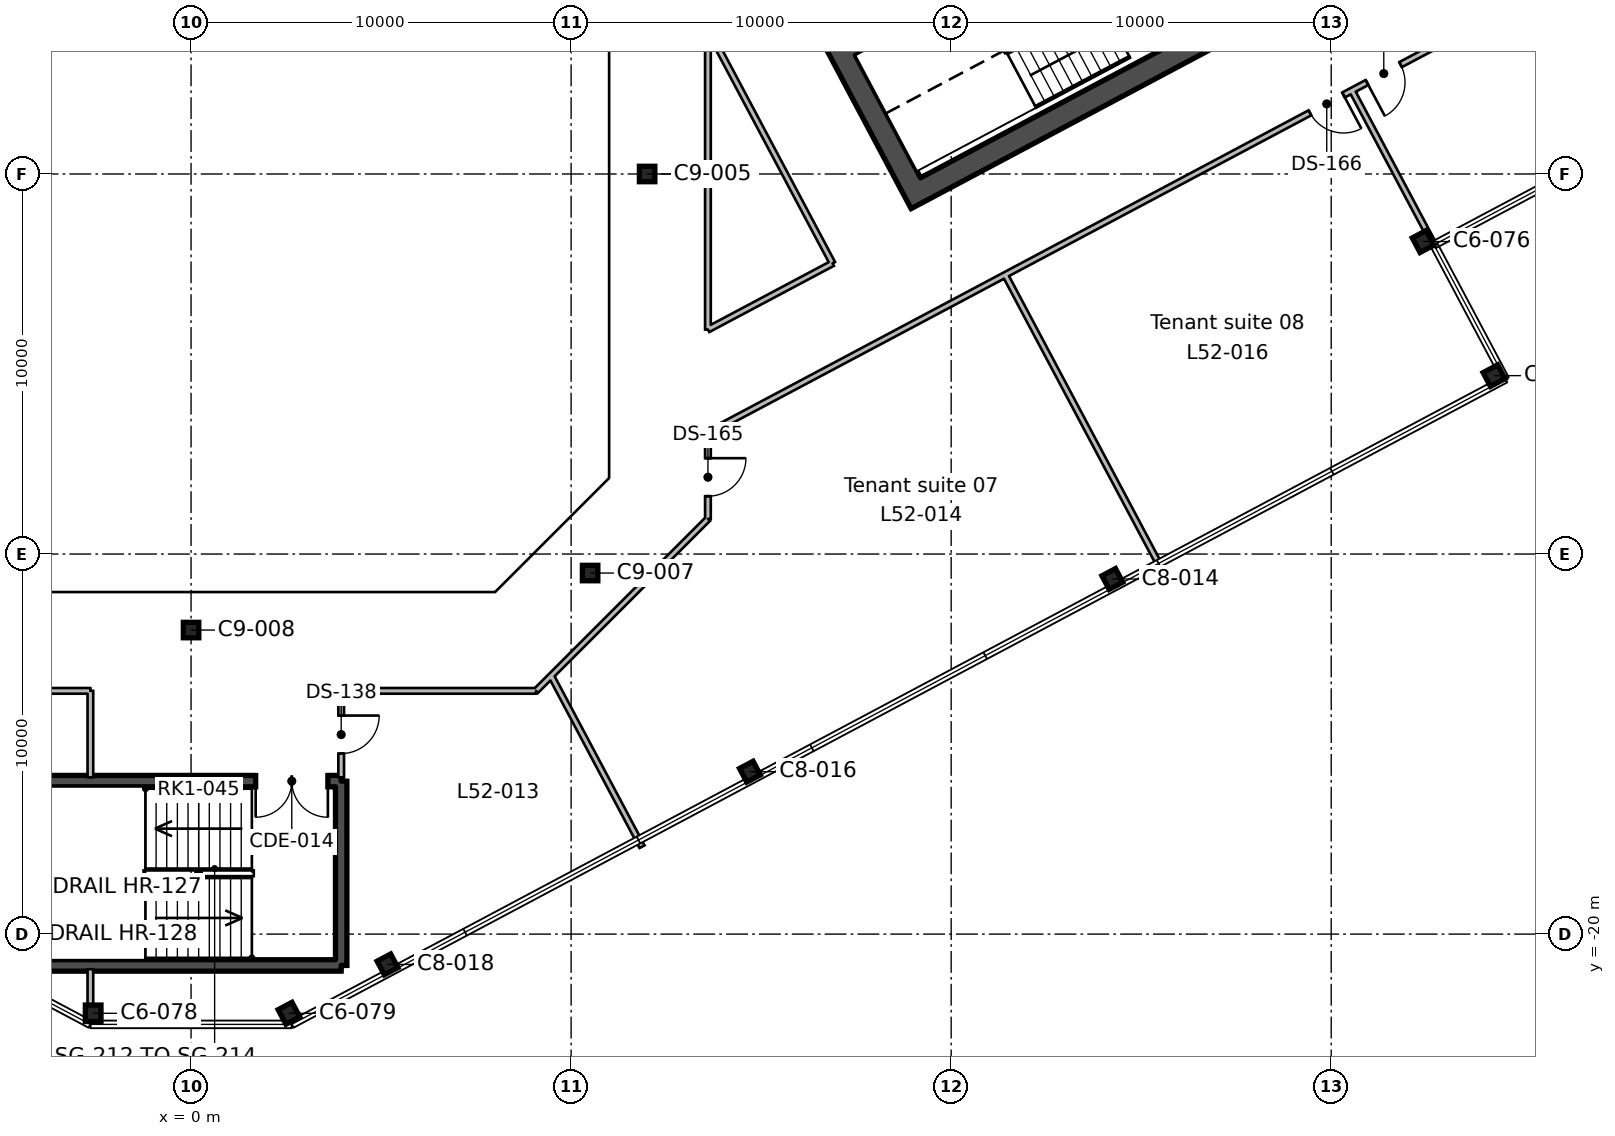
"""IFC4 building model, lengths in metres.
Left out: names, types, materials, properties, quantities, classifications, styles, units other than length and angle.
Written with IfcOpenShell. Run it as: python <this file> out.ifc"""

import sys

from ifc_helpers import new_model, si_unit, direction, frame, frame_2d, origin, origin_2d, place, context, subcontext, project, spatial, rectangle, hollow_rectangle, i_section, extrude, element, fill, save


model = new_model("IFC4")
c1 = context("Model", 3, precision=1e-05, world=origin(), true_north=direction((0.0, 1.0)))
c2 = subcontext(c1, "Body", "Model", "MODEL_VIEW")
j1 = project(units=[si_unit("LENGTHUNIT", "METRE"), si_unit("PLANEANGLEUNIT", "RADIAN")], contexts=[c1])
p1 = place(None, origin())
s1 = spatial("IfcSite", under=j1, at=p1, CompositionType="ELEMENT")
p2 = place(p1, origin())
s2 = spatial("IfcBuilding", under=s1, at=p2, CompositionType="ELEMENT")
p3 = place(p2, frame((0.0, 0.0, 236.4)))
s3 = spatial("IfcBuildingStorey", under=s2, at=p3, CompositionType="ELEMENT", Elevation=236.4)
for number, where, z_axis, x_axis in (
    (1, (-2.576, -22.084, 0.0), (0.0, 0.0, 1.0), (1.0, 0.0, 0.0)),
    (2, (2.576, -22.084, 0.0), (0.0, 0.0, 1.0), (0.883, 0.469, 0.0)),
):
    element("IfcColumn", number, at=place(p3, frame(where, z_axis=z_axis, x_axis=x_axis)), inside=s3, PredefinedType="COLUMN", context=c2, shape_type="SweptSolid", body=[
        extrude(i_section(OverallWidth=0.412, OverallDepth=0.434, WebThickness=0.036, FlangeThickness=0.057, FilletRadius=0.015, at=origin_2d()), origin(), (0.0, 0.0, 1.0), 3.9),
    ])
for number, where, z_axis, x_axis in (
    (3, (5.169, -20.798, 0.0), (0.0, 0.0, 1.0), (0.883, 0.469, 0.0)),
    (4, (14.705, -15.727, 0.0), (0.0, 0.0, 1.0), (0.883, 0.469, 0.0)),
):
    element("IfcColumn", number, at=place(p3, frame(where, z_axis=z_axis, x_axis=x_axis)), inside=s3, PredefinedType="COLUMN", context=c2, shape_type="SweptSolid", body=[
        extrude(i_section(OverallWidth=0.404, OverallDepth=0.406, WebThickness=0.027, FlangeThickness=0.044, FilletRadius=0.015, at=origin_2d()), origin(), (0.0, 0.0, 1.0), 3.9),
    ])
p4 = place(p3, frame((0.0, -12.0, 0.0), z_axis=(0.0, 0.0, 1.0), x_axis=(1.0, 0.0, 0.0)))
e5 = element("IfcColumn", 5, at=p4, inside=s3, PredefinedType="COLUMN", context=c2, shape_type="SweptSolid", body=[
    extrude(hollow_rectangle(XDim=0.406, YDim=0.406, WallThickness=0.015, InnerFilletRadius=0.007, OuterFilletRadius=0.022, at=origin_2d()), origin(), (0.0, 0.0, 1.0), 3.9),
])
p5 = place(p3, frame((24.241, -10.657, 0.0), z_axis=(0.0, 0.0, 1.0), x_axis=(0.882947592859, 0.469471562786, 0.0)))
e6 = element("IfcColumn", 6, at=p5, inside=s3, PredefinedType="COLUMN", context=c2, shape_type="SweptSolid", body=[
    extrude(i_section(OverallWidth=0.404, OverallDepth=0.406, WebThickness=0.027, FlangeThickness=0.044, FilletRadius=0.015, at=origin_2d()), origin(), (0.0, 0.0, 1.0), 3.9),
])
p6 = place(p3, frame((10.5, -10.5, 0.0), z_axis=(0.0, 0.0, 1.0), x_axis=(1.0, 0.0, 0.0)))
e7 = element("IfcColumn", 7, at=p6, inside=s3, PredefinedType="COLUMN", context=c2, shape_type="SweptSolid", body=[
    extrude(hollow_rectangle(XDim=0.406, YDim=0.406, WallThickness=0.015, InnerFilletRadius=0.007, OuterFilletRadius=0.022, at=origin_2d()), origin(), (0.0, 0.0, 1.0), 3.9),
])
for number, where, z_axis, x_axis in (
    (8, (34.285, -5.306, 0.0), (0.0, 0.0, 1.0), (-0.469, 0.883, 0.0)),
    (9, (32.417, -1.777, 0.0), (0.0, 0.0, 1.0), (0.883, 0.469, 0.0)),
):
    element("IfcColumn", number, at=place(p3, frame(where, z_axis=z_axis, x_axis=x_axis)), inside=s3, PredefinedType="COLUMN", context=c2, shape_type="SweptSolid", body=[
        extrude(i_section(OverallWidth=0.412, OverallDepth=0.434, WebThickness=0.036, FlangeThickness=0.057, FilletRadius=0.015, at=origin_2d()), origin(), (0.0, 0.0, 1.0), 3.9),
    ])
p7 = place(p3, frame((12.0, 0.0, 0.0), z_axis=(0.0, 0.0, 1.0), x_axis=(1.0, 0.0, 0.0)))
e10 = element("IfcColumn", 10, at=p7, inside=s3, PredefinedType="COLUMN", context=c2, shape_type="SweptSolid", body=[
    extrude(hollow_rectangle(XDim=0.406, YDim=0.406, WallThickness=0.015, InnerFilletRadius=0.007, OuterFilletRadius=0.022, at=origin_2d()), origin(), (0.0, 0.0, 1.0), 3.9),
])
p8 = place(p3, frame((19.211, -0.771, 0.0), z_axis=(0.0, 0.0, 1.0), x_axis=(-0.469463742137, 0.882951751127, 0.0)))
e11 = element("IfcWall", 11, at=p8, inside=s3, PredefinedType="SHEAR", context=c2, shape_type="SweptSolid", body=[
    extrude(rectangle(XDim=19.4, YDim=0.6, at=frame_2d((9.7, 0.0))), origin(), (0.0, 0.0, 1.0), 3.9),
])
p9 = place(p8, frame((6.7, 0.0, 0.0)))
e12 = element("IfcOpeningElement", 12, at=p9, cuts=e11, PredefinedType="OPENING", context=c2, shape_type="SweptSolid", body=[
    extrude(rectangle(XDim=2.4, YDim=2.4, at=frame_2d((1.2, 1.2))), frame((0.0, 0.31, 0.0), z_axis=(0.0, -1.0, 0.0), x_axis=(1.0, 0.0, 0.0)), (0.0, 0.0, 1.0), 0.62),
])
p10 = place(p3, frame((19.335, -0.366, 0.0), z_axis=(0.0, 0.0, 1.0), x_axis=(0.88294509198, 0.469476266226, 0.0)))
e13 = element("IfcWall", 13, at=p10, inside=s3, PredefinedType="SHEAR", context=c2, shape_type="SweptSolid", body=[
    extrude(rectangle(XDim=20.2, YDim=0.6, at=frame_2d((10.1, 0.0))), origin(), (0.0, 0.0, 1.0), 3.9),
])
p11 = place(p3, frame((17.434, 3.21, 0.0), z_axis=(0.0, 0.0, 1.0), x_axis=(0.882940221191, 0.469485426614, 0.0)))
e14 = element("IfcWall", 14, at=p11, inside=s3, PredefinedType="SHEAR", context=c2, shape_type="SweptSolid", body=[
    extrude(rectangle(XDim=8.0, YDim=0.2, at=frame_2d((4.0, 0.0))), origin(), (0.0, 0.0, 1.0), 3.9),
])
p12 = place(p3, frame((3.95, -15.975, 0.0), z_axis=(0.0, 0.0, 1.0), x_axis=(0.0, -1.0, 0.0)))
e15 = element("IfcWall", 15, at=p12, inside=s3, PredefinedType="SHEAR", context=c2, shape_type="SweptSolid", body=[
    extrude(rectangle(XDim=4.85, YDim=0.3, at=frame_2d((2.425, 0.0))), origin(), (0.0, 0.0, 1.0), 3.9),
])
p13 = place(p3, frame((3.95, -20.825, 0.0), z_axis=(0.0, 0.0, 1.0), x_axis=(-1.0, 0.0, 0.0)))
e16 = element("IfcWall", 16, at=p13, inside=s3, PredefinedType="SHEAR", context=c2, shape_type="SweptSolid", body=[
    extrude(rectangle(XDim=8.3, YDim=0.3, at=frame_2d((4.15, 0.0))), origin(), (0.0, 0.0, 1.0), 3.9),
])
p14 = place(p3, frame((-4.35, -15.975, 0.0), z_axis=(0.0, 0.0, 1.0), x_axis=(1.0, 0.0, 0.0)))
e17 = element("IfcWall", 17, at=p14, inside=s3, PredefinedType="SHEAR", context=c2, shape_type="SweptSolid", body=[
    extrude(rectangle(XDim=8.3, YDim=0.3, at=frame_2d((4.15, 0.0))), origin(), (0.0, 0.0, 1.0), 3.9),
])
p15 = place(p14, frame((6.05, 0.0, 0.0)))
e18 = element("IfcOpeningElement", 18, at=p15, cuts=e17, PredefinedType="OPENING", context=c2, shape_type="SweptSolid", body=[
    extrude(rectangle(XDim=1.9, YDim=2.1, at=frame_2d((0.95, 1.05))), frame((0.0, 0.16, 0.0), z_axis=(0.0, -1.0, 0.0), x_axis=(1.0, 0.0, 0.0)), (0.0, 0.0, 1.0), 0.32),
])
p16 = place(p3, frame((-2.649, -13.6, 0.0), z_axis=(0.0, 0.0, 1.0), x_axis=(-1.0, 0.0, 0.0)))
e19 = element("IfcWall", 19, at=p16, inside=s3, PredefinedType="PARTITIONING", context=c2, shape_type="SweptSolid", body=[
    extrude(rectangle(XDim=6.428, YDim=0.15, at=frame_2d((3.214, 0.0))), origin(), (0.0, 0.0, 1.0), 3.54),
])
p17 = place(p3, frame((-2.649, -13.6, 0.0), z_axis=(0.0, 0.0, 1.0), x_axis=(0.0, -1.0, 0.0)))
e20 = element("IfcWall", 20, at=p17, inside=s3, PredefinedType="PARTITIONING", context=c2, shape_type="SweptSolid", body=[
    extrude(rectangle(XDim=2.275, YDim=0.15, at=frame_2d((1.137, 0.0))), origin(), (0.0, 0.0, 1.0), 3.54),
])
p18 = place(p3, frame((-2.649, -20.925, 0.0), z_axis=(0.0, 0.0, 1.0), x_axis=(0.0, -1.0, 0.0)))
e21 = element("IfcWall", 21, at=p18, inside=s3, PredefinedType="PARTITIONING", context=c2, shape_type="SweptSolid", body=[
    extrude(rectangle(XDim=0.942, YDim=0.15, at=frame_2d((0.471, 0.0))), origin(), (0.0, 0.0, 1.0), 3.54),
])
p19 = place(p3, frame((4.938, -13.6, 0.0), z_axis=(0.0, 0.0, 1.0), x_axis=(-1.0, 0.0, 0.0)))
e22 = element("IfcWall", 22, at=p19, inside=s3, PredefinedType="PARTITIONING", context=c2, shape_type="SweptSolid", body=[
    extrude(rectangle(XDim=0.988, YDim=0.15, at=frame_2d((0.494, 0.0))), origin(), (0.0, 0.0, 1.0), 3.54),
])
p20 = place(p3, frame((3.95, -13.6, 0.0), z_axis=(0.0, 0.0, 1.0), x_axis=(0.0, -1.0, 0.0)))
e23 = element("IfcWall", 23, at=p20, inside=s3, PredefinedType="PARTITIONING", context=c2, shape_type="SweptSolid", body=[
    extrude(rectangle(XDim=2.275, YDim=0.15, at=frame_2d((1.137, 0.0))), origin(), (0.0, 0.0, 1.0), 3.54),
])
p21 = place(p20, frame((0.65, 0.0, 0.0)))
e24 = element("IfcOpeningElement", 24, at=p21, cuts=e23, PredefinedType="OPENING", context=c2, shape_type="SweptSolid", body=[
    extrude(rectangle(XDim=1.0, YDim=2.1, at=frame_2d((0.5, 1.05))), frame((0.0, 0.085, 0.0), z_axis=(0.0, -1.0, 0.0), x_axis=(1.0, 0.0, 0.0)), (0.0, 0.0, 1.0), 0.17),
])
p22 = place(p3, frame((9.473, -13.204, 0.0), z_axis=(0.0, 0.0, 1.0), x_axis=(-0.707106781187, -0.707106781187, 0.0)))
e25 = element("IfcWall", 25, at=p22, inside=s3, PredefinedType="PARTITIONING", context=c2, shape_type="SweptSolid", body=[
    extrude(rectangle(XDim=0.56, YDim=0.15, at=frame_2d((0.28, 0.0))), origin(), (0.0, 0.0, 1.0), 3.54),
])
p23 = place(p3, frame((9.077, -13.6, 0.0), z_axis=(0.0, 0.0, 1.0), x_axis=(-1.0, 0.0, 0.0)))
e26 = element("IfcWall", 26, at=p23, inside=s3, PredefinedType="PARTITIONING", context=c2, shape_type="SweptSolid", body=[
    extrude(rectangle(XDim=4.139, YDim=0.15, at=frame_2d((2.069, 0.0))), origin(), (0.0, 0.0, 1.0), 3.54),
])
p24 = place(p3, frame((9.474, -13.202, 0.0), z_axis=(0.0, 0.0, 1.0), x_axis=(0.46942145483, -0.882974233908, 0.0)))
e27 = element("IfcWall", 27, at=p24, inside=s3, PredefinedType="PARTITIONING", context=c2, shape_type="SweptSolid", body=[
    extrude(rectangle(XDim=5.095, YDim=0.15, at=frame_2d((2.548, 0.0))), origin(), (0.0, 0.0, 1.0), 3.54),
])
p25 = place(p3, frame((13.6, -6.828, 0.0), z_axis=(0.0, 0.0, 1.0), x_axis=(0.0, -1.0, 0.0)))
e28 = element("IfcWall", 28, at=p25, inside=s3, PredefinedType="PARTITIONING", context=c2, shape_type="SweptSolid", body=[
    extrude(rectangle(XDim=2.249, YDim=0.15, at=frame_2d((1.125, 0.0))), origin(), (0.0, 0.0, 1.0), 3.54),
])
p26 = place(p25, frame((0.65, 0.0, 0.0)))
e29 = element("IfcOpeningElement", 29, at=p26, cuts=e28, PredefinedType="OPENING", context=c2, shape_type="SweptSolid", body=[
    extrude(rectangle(XDim=1.0, YDim=2.1, at=frame_2d((0.5, 1.05))), frame((0.0, 0.085, 0.0), z_axis=(0.0, -1.0, 0.0), x_axis=(1.0, 0.0, 0.0)), (0.0, 0.0, 1.0), 0.17),
])
p27 = place(p3, frame((13.6, -9.077, 0.0), z_axis=(0.0, 0.0, 1.0), x_axis=(-0.707106781187, -0.707106781187, 0.0)))
e30 = element("IfcWall", 30, at=p27, inside=s3, PredefinedType="PARTITIONING", context=c2, shape_type="SweptSolid", body=[
    extrude(rectangle(XDim=5.882, YDim=0.15, at=frame_2d((2.941, 0.0))), origin(), (0.0, 0.0, 1.0), 3.54),
])
p28 = place(p3, frame((21.421, -2.654, 0.0), z_axis=(0.0, 0.0, 1.0), x_axis=(0.469445946219, -0.882961212952, 0.0)))
e31 = element("IfcWall", 31, at=p28, inside=s3, PredefinedType="PARTITIONING", context=c2, shape_type="SweptSolid", body=[
    extrude(rectangle(XDim=8.8, YDim=0.15, at=frame_2d((4.4, 0.0))), origin(), (0.0, 0.0, 1.0), 3.54),
])
p29 = place(p3, frame((48.38, 11.679, 0.0), z_axis=(0.0, 0.0, 1.0), x_axis=(-0.882955973974, -0.469455799862, 0.0)))
e32 = element("IfcWall", 32, at=p29, inside=s3, PredefinedType="PARTITIONING", context=c2, shape_type="SweptSolid", body=[
    extrude(rectangle(XDim=39.39, YDim=0.15, at=frame_2d((19.695, 0.0))), origin(), (0.0, 0.0, 1.0), 3.54),
])
p30 = place(p29, frame((20.45, 0.0, 0.0)))
e33 = element("IfcOpeningElement", 33, at=p30, cuts=e32, PredefinedType="OPENING", context=c2, shape_type="SweptSolid", body=[
    extrude(rectangle(XDim=1.0, YDim=2.1, at=frame_2d((0.5, 1.05))), frame((0.0, 0.085, 0.0), z_axis=(0.0, -1.0, 0.0), x_axis=(1.0, 0.0, 0.0)), (0.0, 0.0, 1.0), 0.17),
])
p31 = place(p29, frame((18.75, 0.0, 0.0)))
e34 = element("IfcOpeningElement", 34, at=p31, cuts=e32, PredefinedType="OPENING", context=c2, shape_type="SweptSolid", body=[
    extrude(rectangle(XDim=1.0, YDim=2.1, at=frame_2d((0.5, 1.05))), frame((0.0, 0.085, 0.0), z_axis=(0.0, -1.0, 0.0), x_axis=(1.0, 0.0, 0.0)), (0.0, 0.0, 1.0), 0.17),
])
p32 = place(p29, frame((7.65, 0.0, 0.0)))
e35 = element("IfcOpeningElement", 35, at=p32, cuts=e32, PredefinedType="OPENING", context=c2, shape_type="SweptSolid", body=[
    extrude(rectangle(XDim=1.0, YDim=2.1, at=frame_2d((0.5, 1.05))), frame((0.0, 0.085, 0.0), z_axis=(0.0, -1.0, 0.0), x_axis=(1.0, 0.0, 0.0)), (0.0, 0.0, 1.0), 0.17),
])
p33 = place(p3, frame((30.544, 2.197, 0.0), z_axis=(0.0, 0.0, 1.0), x_axis=(0.469518415739, -0.882922679107, 0.0)))
e36 = element("IfcWall", 36, at=p33, inside=s3, PredefinedType="PARTITIONING", context=c2, shape_type="SweptSolid", body=[
    extrude(rectangle(XDim=4.882, YDim=0.15, at=frame_2d((2.441, 0.0))), origin(), (0.0, 0.0, 1.0), 3.54),
])
p34 = place(p3, frame((16.879, -2.351, 0.0), z_axis=(0.0, 0.0, 1.0), x_axis=(-0.469386900786, 0.882992603236, 0.0)))
e37 = element("IfcWall", 37, at=p34, inside=s3, PredefinedType="PARTITIONING", context=c2, shape_type="SweptSolid", body=[
    extrude(rectangle(XDim=6.985, YDim=0.15, at=frame_2d((3.493, 0.0))), origin(), (0.0, 0.0, 1.0), 3.54),
])
p35 = place(p3, frame((13.6, 3.817, 0.0), z_axis=(0.0, 0.0, 1.0), x_axis=(0.0, -1.0, 0.0)))
e38 = element("IfcWall", 38, at=p35, inside=s3, PredefinedType="PARTITIONING", context=c2, shape_type="SweptSolid", body=[
    extrude(rectangle(XDim=7.911, YDim=0.15, at=frame_2d((3.956, 0.0))), origin(), (0.0, 0.0, 1.0), 3.54),
])
p36 = place(p3, frame((13.6, -4.094, 0.0), z_axis=(0.0, 0.0, 1.0), x_axis=(0.882998216328, 0.469376341502, 0.0)))
e39 = element("IfcWall", 39, at=p36, inside=s3, PredefinedType="PARTITIONING", context=c2, shape_type="SweptSolid", body=[
    extrude(rectangle(XDim=3.713, YDim=0.15, at=frame_2d((1.857, 0.0))), origin(), (0.0, 0.0, 1.0), 3.54),
])
p37 = place(p15, frame((1.9, 0.0, 0.0), z_axis=(0.0, 0.0, 1.0), x_axis=(-1.0, 0.0, 0.0)))
e40 = element("IfcDoor", 40, at=p37, inside=s3, OperationType="DOUBLE_DOOR_SINGLE_SWING", PredefinedType="DOOR", context=c2, shape_type="SweptSolid", body=[
    extrude(rectangle(XDim=1.9, YDim=2.1, at=frame_2d((0.95, 1.05))), frame((0.0, 0.025, 0.0), z_axis=(0.0, -1.0, 0.0), x_axis=(1.0, 0.0, 0.0)), (0.0, 0.0, 1.0), 0.05),
])
fill(e18, e40)
p38 = place(p21, origin())
e41 = element("IfcDoor", 41, at=p38, inside=s3, OperationType="SINGLE_SWING_LEFT", PredefinedType="DOOR", context=c2, shape_type="SweptSolid", body=[
    extrude(rectangle(XDim=1.0, YDim=2.1, at=frame_2d((0.5, 1.05))), frame((0.0, 0.025, 0.0), z_axis=(0.0, -1.0, 0.0), x_axis=(1.0, 0.0, 0.0)), (0.0, 0.0, 1.0), 0.05),
])
fill(e24, e41)
p39 = place(p26, origin())
e42 = element("IfcDoor", 42, at=p39, inside=s3, OperationType="SINGLE_SWING_LEFT", PredefinedType="DOOR", context=c2, shape_type="SweptSolid", body=[
    extrude(rectangle(XDim=1.0, YDim=2.1, at=frame_2d((0.5, 1.05))), frame((0.0, 0.025, 0.0), z_axis=(0.0, -1.0, 0.0), x_axis=(1.0, 0.0, 0.0)), (0.0, 0.0, 1.0), 0.05),
])
fill(e29, e42)
p40 = place(p30, origin())
e43 = element("IfcDoor", 43, at=p40, inside=s3, OperationType="SINGLE_SWING_LEFT", PredefinedType="DOOR", context=c2, shape_type="SweptSolid", body=[
    extrude(rectangle(XDim=1.0, YDim=2.1, at=frame_2d((0.5, 1.05))), frame((0.0, 0.025, 0.0), z_axis=(0.0, -1.0, 0.0), x_axis=(1.0, 0.0, 0.0)), (0.0, 0.0, 1.0), 0.05),
])
fill(e33, e43)
p41 = place(p31, origin())
e44 = element("IfcDoor", 44, at=p41, inside=s3, OperationType="SINGLE_SWING_RIGHT", PredefinedType="DOOR", context=c2, shape_type="SweptSolid", body=[
    extrude(rectangle(XDim=1.0, YDim=2.1, at=frame_2d((0.5, 1.05))), frame((0.0, 0.025, 0.0), z_axis=(0.0, -1.0, 0.0), x_axis=(1.0, 0.0, 0.0)), (0.0, 0.0, 1.0), 0.05),
])
fill(e34, e44)
save(model, sys.argv[1])
